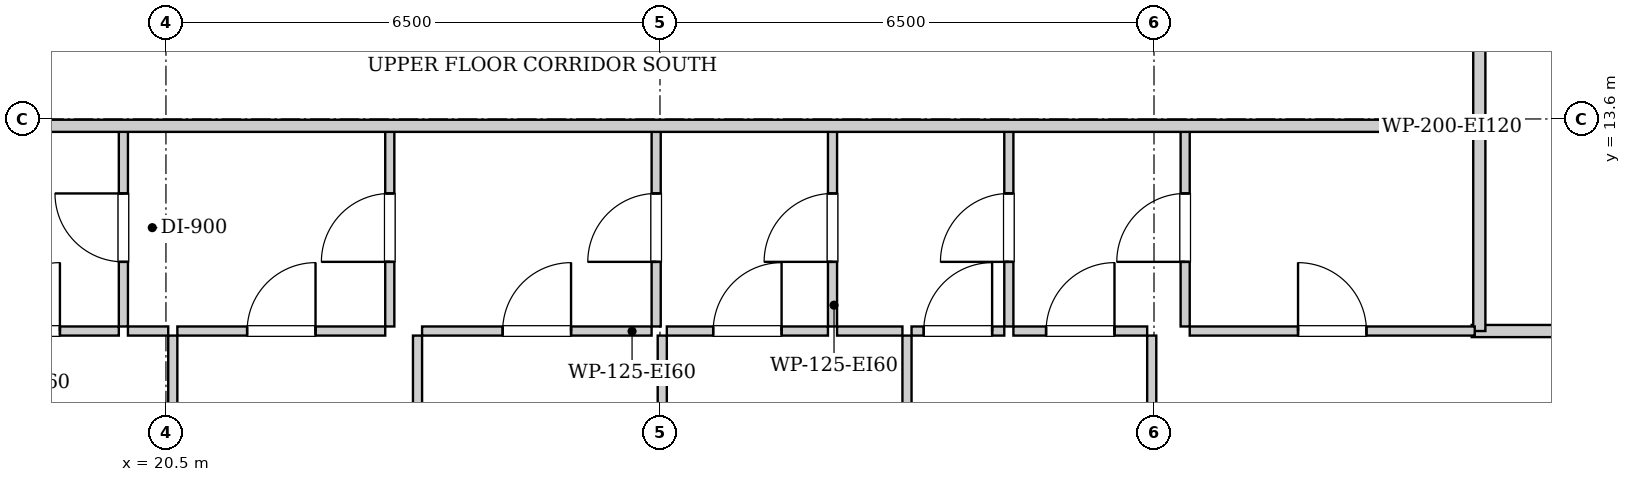
"""IFC4 building model, lengths in metres.
Left out: names, types, materials, properties, quantities, classifications, styles, units other than length and angle.
Written with IfcOpenShell. Run it as: python <this file> out.ifc"""

import sys

from ifc_helpers import new_model, si_unit, direction, frame, frame_2d, origin, place, context, subcontext, project, spatial, rectangle, extrude, element, fill, save


model = new_model("IFC4")
c1 = context("Model", 3, precision=1e-05, world=origin(), true_north=direction((0.0, 1.0)))
c2 = subcontext(c1, "Body", "Model", "MODEL_VIEW")
j1 = project(units=[si_unit("LENGTHUNIT", "METRE"), si_unit("PLANEANGLEUNIT", "RADIAN")], contexts=[c1])
p1 = place(None, origin())
s1 = spatial("IfcSite", under=j1, at=p1, CompositionType="ELEMENT")
p2 = place(p1, origin())
s2 = spatial("IfcBuilding", under=s1, at=p2, CompositionType="ELEMENT")
p3 = place(p2, frame((0.0, 0.0, 177.7)))
s3 = spatial("IfcBuildingStorey", under=s2, at=p3, CompositionType="ELEMENT", Elevation=177.7)
p4 = place(p3, frame((37.78, 13.51, 0.0), z_axis=(0.0, 0.0, 1.0), x_axis=(0.0, 1.0, 0.0)))
e1 = element("IfcWall", 1, at=p4, inside=s3, PredefinedType="PARTITIONING", context=c2, shape_type="SweptSolid", body=[
    extrude(rectangle(XDim=1.58, YDim=0.16, at=frame_2d((0.79, 0.0))), origin(), (0.0, 0.0, 1.0), 3.04),
])
p5 = place(p3, frame((37.68, 10.81, 0.0), z_axis=(0.0, 0.0, 1.0), x_axis=(1.0, 0.0, 0.0)))
e2 = element("IfcWall", 2, at=p5, inside=s3, PredefinedType="PARTITIONING", context=c2, shape_type="SweptSolid", body=[
    extrude(rectangle(XDim=2.34, YDim=0.16, at=frame_2d((1.17, 0.0))), origin(), (0.0, 0.0, 1.0), 3.04),
])
p6 = place(p3, frame((37.78, 10.81, 0.0), z_axis=(0.0, 0.0, 1.0), x_axis=(0.0, 1.0, 0.0)))
e3 = element("IfcWall", 3, at=p6, inside=s3, PredefinedType="PARTITIONING", context=c2, shape_type="SweptSolid", body=[
    extrude(rectangle(XDim=2.66, YDim=0.16, at=frame_2d((1.33, 0.0))), origin(), (0.0, 0.0, 1.0), 3.04),
])
p7 = place(p3, frame((19.94, 10.87, 0.0), z_axis=(0.0, 0.0, 1.0), x_axis=(0.0, 1.0, 0.0)))
e4 = element("IfcWall", 4, at=p7, inside=s3, PredefinedType="PARTITIONING", context=c2, shape_type="SweptSolid", body=[
    extrude(rectangle(XDim=2.6, YDim=0.12, at=frame_2d((1.3, 0.0))), origin(), (0.0, 0.0, 1.0), 3.04),
])
p8 = place(p7, frame((0.85, 0.0, 0.0)))
e5 = element("IfcOpeningElement", 5, at=p8, cuts=e4, PredefinedType="OPENING", context=c2, shape_type="SweptSolid", body=[
    extrude(rectangle(XDim=0.9, YDim=2.05, at=frame_2d((0.45, 1.025))), frame((0.0, 0.07, 0.0), z_axis=(0.0, -1.0, 0.0), x_axis=(1.0, 0.0, 0.0)), (0.0, 0.0, 1.0), 0.14),
])
p9 = place(p3, frame((17.43, 10.81, 0.0), z_axis=(0.0, 0.0, 1.0), x_axis=(1.0, 0.0, 0.0)))
e6 = element("IfcWall", 6, at=p9, inside=s3, PredefinedType="PARTITIONING", context=c2, shape_type="SweptSolid", body=[
    extrude(rectangle(XDim=2.45, YDim=0.12, at=frame_2d((1.225, 0.0))), origin(), (0.0, 0.0, 1.0), 3.04),
])
p10 = place(p9, frame((0.775, 0.0, 0.0)))
e7 = element("IfcOpeningElement", 7, at=p10, cuts=e6, PredefinedType="OPENING", context=c2, shape_type="SweptSolid", body=[
    extrude(rectangle(XDim=0.9, YDim=2.05, at=frame_2d((0.45, 1.025))), frame((0.0, 0.07, 0.0), z_axis=(0.0, -1.0, 0.0), x_axis=(1.0, 0.0, 0.0)), (0.0, 0.0, 1.0), 0.14),
])
p11 = place(p3, frame((23.445, 10.87, 0.0), z_axis=(0.0, 0.0, 1.0), x_axis=(0.0, 1.0, 0.0)))
e8 = element("IfcWall", 8, at=p11, inside=s3, PredefinedType="PARTITIONING", context=c2, shape_type="SweptSolid", body=[
    extrude(rectangle(XDim=2.6, YDim=0.12, at=frame_2d((1.3, 0.0))), origin(), (0.0, 0.0, 1.0), 3.04),
])
p12 = place(p11, frame((0.85, 0.0, 0.0)))
e9 = element("IfcOpeningElement", 9, at=p12, cuts=e8, PredefinedType="OPENING", context=c2, shape_type="SweptSolid", body=[
    extrude(rectangle(XDim=0.9, YDim=2.05, at=frame_2d((0.45, 1.025))), frame((0.0, 0.07, 0.0), z_axis=(0.0, -1.0, 0.0), x_axis=(1.0, 0.0, 0.0)), (0.0, 0.0, 1.0), 0.14),
])
p13 = place(p3, frame((20.0, 10.81, 0.0), z_axis=(0.0, 0.0, 1.0), x_axis=(1.0, 0.0, 0.0)))
e10 = element("IfcWall", 10, at=p13, inside=s3, PredefinedType="PARTITIONING", context=c2, shape_type="SweptSolid", body=[
    extrude(rectangle(XDim=0.53, YDim=0.12, at=frame_2d((0.265, 0.0))), origin(), (0.0, 0.0, 1.0), 3.04),
])
p14 = place(p3, frame((20.65, 10.81, 0.0), z_axis=(0.0, 0.0, 1.0), x_axis=(1.0, 0.0, 0.0)))
e11 = element("IfcWall", 11, at=p14, inside=s3, PredefinedType="PARTITIONING", context=c2, shape_type="SweptSolid", body=[
    extrude(rectangle(XDim=2.735, YDim=0.12, at=frame_2d((1.368, 0.0))), origin(), (0.0, 0.0, 1.0), 3.04),
])
p15 = place(p14, frame((0.918, 0.0, 0.0)))
e12 = element("IfcOpeningElement", 12, at=p15, cuts=e11, PredefinedType="OPENING", context=c2, shape_type="SweptSolid", body=[
    extrude(rectangle(XDim=0.9, YDim=2.05, at=frame_2d((0.45, 1.025))), frame((0.0, 0.07, 0.0), z_axis=(0.0, -1.0, 0.0), x_axis=(1.0, 0.0, 0.0)), (0.0, 0.0, 1.0), 0.14),
])
p16 = place(p3, frame((26.95, 10.87, 0.0), z_axis=(0.0, 0.0, 1.0), x_axis=(0.0, 1.0, 0.0)))
e13 = element("IfcWall", 13, at=p16, inside=s3, PredefinedType="PARTITIONING", context=c2, shape_type="SweptSolid", body=[
    extrude(rectangle(XDim=2.6, YDim=0.12, at=frame_2d((1.3, 0.0))), origin(), (0.0, 0.0, 1.0), 3.04),
])
p17 = place(p16, frame((0.85, 0.0, 0.0)))
e14 = element("IfcOpeningElement", 14, at=p17, cuts=e13, PredefinedType="OPENING", context=c2, shape_type="SweptSolid", body=[
    extrude(rectangle(XDim=0.9, YDim=2.05, at=frame_2d((0.45, 1.025))), frame((0.0, 0.07, 0.0), z_axis=(0.0, -1.0, 0.0), x_axis=(1.0, 0.0, 0.0)), (0.0, 0.0, 1.0), 0.14),
])
p18 = place(p3, frame((23.87, 10.81, 0.0), z_axis=(0.0, 0.0, 1.0), x_axis=(1.0, 0.0, 0.0)))
e15 = element("IfcWall", 15, at=p18, inside=s3, PredefinedType="PARTITIONING", context=c2, shape_type="SweptSolid", body=[
    extrude(rectangle(XDim=3.02, YDim=0.12, at=frame_2d((1.51, 0.0))), origin(), (0.0, 0.0, 1.0), 3.04),
])
p19 = place(p18, frame((1.06, 0.0, 0.0)))
e16 = element("IfcOpeningElement", 16, at=p19, cuts=e15, PredefinedType="OPENING", context=c2, shape_type="SweptSolid", body=[
    extrude(rectangle(XDim=0.9, YDim=2.05, at=frame_2d((0.45, 1.025))), frame((0.0, 0.07, 0.0), z_axis=(0.0, -1.0, 0.0), x_axis=(1.0, 0.0, 0.0)), (0.0, 0.0, 1.0), 0.14),
])
p20 = place(p3, frame((29.27, 10.87, 0.0), z_axis=(0.0, 0.0, 1.0), x_axis=(0.0, 1.0, 0.0)))
e17 = element("IfcWall", 17, at=p20, inside=s3, PredefinedType="PARTITIONING", context=c2, shape_type="SweptSolid", body=[
    extrude(rectangle(XDim=2.6, YDim=0.12, at=frame_2d((1.3, 0.0))), origin(), (0.0, 0.0, 1.0), 3.04),
])
p21 = place(p20, frame((0.85, 0.0, 0.0)))
e18 = element("IfcOpeningElement", 18, at=p21, cuts=e17, PredefinedType="OPENING", context=c2, shape_type="SweptSolid", body=[
    extrude(rectangle(XDim=0.9, YDim=2.05, at=frame_2d((0.45, 1.025))), frame((0.0, 0.07, 0.0), z_axis=(0.0, -1.0, 0.0), x_axis=(1.0, 0.0, 0.0)), (0.0, 0.0, 1.0), 0.14),
])
p22 = place(p3, frame((27.09, 10.81, 0.0), z_axis=(0.0, 0.0, 1.0), x_axis=(1.0, 0.0, 0.0)))
e19 = element("IfcWall", 19, at=p22, inside=s3, PredefinedType="PARTITIONING", context=c2, shape_type="SweptSolid", body=[
    extrude(rectangle(XDim=2.12, YDim=0.12, at=frame_2d((1.06, 0.0))), origin(), (0.0, 0.0, 1.0), 3.04),
])
p23 = place(p22, frame((0.61, 0.0, 0.0)))
e20 = element("IfcOpeningElement", 20, at=p23, cuts=e19, PredefinedType="OPENING", context=c2, shape_type="SweptSolid", body=[
    extrude(rectangle(XDim=0.9, YDim=2.05, at=frame_2d((0.45, 1.025))), frame((0.0, 0.07, 0.0), z_axis=(0.0, -1.0, 0.0), x_axis=(1.0, 0.0, 0.0)), (0.0, 0.0, 1.0), 0.14),
])
p24 = place(p3, frame((31.59, 10.87, 0.0), z_axis=(0.0, 0.0, 1.0), x_axis=(0.0, 1.0, 0.0)))
e21 = element("IfcWall", 21, at=p24, inside=s3, PredefinedType="PARTITIONING", context=c2, shape_type="SweptSolid", body=[
    extrude(rectangle(XDim=2.6, YDim=0.12, at=frame_2d((1.3, 0.0))), origin(), (0.0, 0.0, 1.0), 3.04),
])
p25 = place(p24, frame((0.85, 0.0, 0.0)))
e22 = element("IfcOpeningElement", 22, at=p25, cuts=e21, PredefinedType="OPENING", context=c2, shape_type="SweptSolid", body=[
    extrude(rectangle(XDim=0.9, YDim=2.05, at=frame_2d((0.45, 1.025))), frame((0.0, 0.07, 0.0), z_axis=(0.0, -1.0, 0.0), x_axis=(1.0, 0.0, 0.0)), (0.0, 0.0, 1.0), 0.14),
])
p26 = place(p3, frame((29.33, 10.81, 0.0), z_axis=(0.0, 0.0, 1.0), x_axis=(1.0, 0.0, 0.0)))
e23 = element("IfcWall", 23, at=p26, inside=s3, PredefinedType="PARTITIONING", context=c2, shape_type="SweptSolid", body=[
    extrude(rectangle(XDim=0.86, YDim=0.12, at=frame_2d((0.43, 0.0))), origin(), (0.0, 0.0, 1.0), 3.04),
])
p27 = place(p3, frame((30.31, 10.81, 0.0), z_axis=(0.0, 0.0, 1.0), x_axis=(1.0, 0.0, 0.0)))
e24 = element("IfcWall", 24, at=p27, inside=s3, PredefinedType="PARTITIONING", context=c2, shape_type="SweptSolid", body=[
    extrude(rectangle(XDim=1.22, YDim=0.12, at=frame_2d((0.61, 0.0))), origin(), (0.0, 0.0, 1.0), 3.04),
])
p28 = place(p27, frame((0.16, 0.0, 0.0)))
e25 = element("IfcOpeningElement", 25, at=p28, cuts=e24, PredefinedType="OPENING", context=c2, shape_type="SweptSolid", body=[
    extrude(rectangle(XDim=0.9, YDim=2.05, at=frame_2d((0.45, 1.025))), frame((0.0, 0.07, 0.0), z_axis=(0.0, -1.0, 0.0), x_axis=(1.0, 0.0, 0.0)), (0.0, 0.0, 1.0), 0.14),
])
p29 = place(p3, frame((33.91, 10.87, 0.0), z_axis=(0.0, 0.0, 1.0), x_axis=(0.0, 1.0, 0.0)))
e26 = element("IfcWall", 26, at=p29, inside=s3, PredefinedType="PARTITIONING", context=c2, shape_type="SweptSolid", body=[
    extrude(rectangle(XDim=2.6, YDim=0.12, at=frame_2d((1.3, 0.0))), origin(), (0.0, 0.0, 1.0), 3.04),
])
p30 = place(p29, frame((0.85, 0.0, 0.0)))
e27 = element("IfcOpeningElement", 27, at=p30, cuts=e26, PredefinedType="OPENING", context=c2, shape_type="SweptSolid", body=[
    extrude(rectangle(XDim=0.9, YDim=2.05, at=frame_2d((0.45, 1.025))), frame((0.0, 0.07, 0.0), z_axis=(0.0, -1.0, 0.0), x_axis=(1.0, 0.0, 0.0)), (0.0, 0.0, 1.0), 0.14),
])
p31 = place(p3, frame((31.65, 10.81, 0.0), z_axis=(0.0, 0.0, 1.0), x_axis=(1.0, 0.0, 0.0)))
e28 = element("IfcWall", 28, at=p31, inside=s3, PredefinedType="PARTITIONING", context=c2, shape_type="SweptSolid", body=[
    extrude(rectangle(XDim=1.76, YDim=0.12, at=frame_2d((0.88, 0.0))), origin(), (0.0, 0.0, 1.0), 3.04),
])
p32 = place(p31, frame((0.43, 0.0, 0.0)))
e29 = element("IfcOpeningElement", 29, at=p32, cuts=e28, PredefinedType="OPENING", context=c2, shape_type="SweptSolid", body=[
    extrude(rectangle(XDim=0.9, YDim=2.05, at=frame_2d((0.45, 1.025))), frame((0.0, 0.07, 0.0), z_axis=(0.0, -1.0, 0.0), x_axis=(1.0, 0.0, 0.0)), (0.0, 0.0, 1.0), 0.14),
])
p33 = place(p3, frame((33.97, 10.81, 0.0), z_axis=(0.0, 0.0, 1.0), x_axis=(1.0, 0.0, 0.0)))
e30 = element("IfcWall", 30, at=p33, inside=s3, PredefinedType="PARTITIONING", context=c2, shape_type="SweptSolid", body=[
    extrude(rectangle(XDim=3.75, YDim=0.12, at=frame_2d((1.875, 0.0))), origin(), (0.0, 0.0, 1.0), 3.04),
])
p34 = place(p33, frame((1.425, 0.0, 0.0)))
e31 = element("IfcOpeningElement", 31, at=p34, cuts=e30, PredefinedType="OPENING", context=c2, shape_type="SweptSolid", body=[
    extrude(rectangle(XDim=0.9, YDim=2.05, at=frame_2d((0.45, 1.025))), frame((0.0, 0.07, 0.0), z_axis=(0.0, -1.0, 0.0), x_axis=(1.0, 0.0, 0.0)), (0.0, 0.0, 1.0), 0.14),
])
p35 = place(p3, frame((20.59, 4.08, 0.0), z_axis=(0.0, 0.0, 1.0), x_axis=(0.0, 1.0, 0.0)))
e32 = element("IfcWall", 32, at=p35, inside=s3, PredefinedType="PARTITIONING", context=c2, shape_type="SweptSolid", body=[
    extrude(rectangle(XDim=6.67, YDim=0.12, at=frame_2d((3.335, 0.0))), origin(), (0.0, 0.0, 1.0), 3.04),
])
p36 = place(p35, frame((2.87, 0.0, 0.0)))
e33 = element("IfcOpeningElement", 33, at=p36, cuts=e32, PredefinedType="OPENING", context=c2, shape_type="SweptSolid", body=[
    extrude(rectangle(XDim=0.9, YDim=2.05, at=frame_2d((0.45, 1.025))), frame((0.0, 0.07, 0.0), z_axis=(0.0, -1.0, 0.0), x_axis=(1.0, 0.0, 0.0)), (0.0, 0.0, 1.0), 0.14),
])
p37 = place(p3, frame((23.81, 4.08, 0.0), z_axis=(0.0, 0.0, 1.0), x_axis=(0.0, 1.0, 0.0)))
e34 = element("IfcWall", 34, at=p37, inside=s3, PredefinedType="PARTITIONING", context=c2, shape_type="SweptSolid", body=[
    extrude(rectangle(XDim=6.67, YDim=0.12, at=frame_2d((3.335, 0.0))), origin(), (0.0, 0.0, 1.0), 3.04),
])
p38 = place(p37, frame((2.87, 0.0, 0.0)))
e35 = element("IfcOpeningElement", 35, at=p38, cuts=e34, PredefinedType="OPENING", context=c2, shape_type="SweptSolid", body=[
    extrude(rectangle(XDim=0.9, YDim=2.05, at=frame_2d((0.45, 1.025))), frame((0.0, 0.07, 0.0), z_axis=(0.0, -1.0, 0.0), x_axis=(1.0, 0.0, 0.0)), (0.0, 0.0, 1.0), 0.14),
])
p39 = place(p3, frame((27.03, 4.08, 0.0), z_axis=(0.0, 0.0, 1.0), x_axis=(0.0, 1.0, 0.0)))
e36 = element("IfcWall", 36, at=p39, inside=s3, PredefinedType="PARTITIONING", context=c2, shape_type="SweptSolid", body=[
    extrude(rectangle(XDim=6.67, YDim=0.12, at=frame_2d((3.335, 0.0))), origin(), (0.0, 0.0, 1.0), 3.04),
])
p40 = place(p39, frame((2.87, 0.0, 0.0)))
e37 = element("IfcOpeningElement", 37, at=p40, cuts=e36, PredefinedType="OPENING", context=c2, shape_type="SweptSolid", body=[
    extrude(rectangle(XDim=0.9, YDim=2.05, at=frame_2d((0.45, 1.025))), frame((0.0, 0.07, 0.0), z_axis=(0.0, -1.0, 0.0), x_axis=(1.0, 0.0, 0.0)), (0.0, 0.0, 1.0), 0.14),
])
p41 = place(p3, frame((30.25, 4.08, 0.0), z_axis=(0.0, 0.0, 1.0), x_axis=(0.0, 1.0, 0.0)))
e38 = element("IfcWall", 38, at=p41, inside=s3, PredefinedType="PARTITIONING", context=c2, shape_type="SweptSolid", body=[
    extrude(rectangle(XDim=6.67, YDim=0.12, at=frame_2d((3.335, 0.0))), origin(), (0.0, 0.0, 1.0), 3.04),
])
p42 = place(p41, frame((2.87, 0.0, 0.0)))
e39 = element("IfcOpeningElement", 39, at=p42, cuts=e38, PredefinedType="OPENING", context=c2, shape_type="SweptSolid", body=[
    extrude(rectangle(XDim=0.9, YDim=2.05, at=frame_2d((0.45, 1.025))), frame((0.0, 0.07, 0.0), z_axis=(0.0, -1.0, 0.0), x_axis=(1.0, 0.0, 0.0)), (0.0, 0.0, 1.0), 0.14),
])
p43 = place(p3, frame((33.47, 6.23, 0.0), z_axis=(0.0, 0.0, 1.0), x_axis=(0.0, 1.0, 0.0)))
e40 = element("IfcWall", 40, at=p43, inside=s3, PredefinedType="PARTITIONING", context=c2, shape_type="SweptSolid", body=[
    extrude(rectangle(XDim=4.52, YDim=0.12, at=frame_2d((2.26, 0.0))), origin(), (0.0, 0.0, 1.0), 3.04),
])
p44 = place(p43, frame((1.81, 0.0, 0.0)))
e41 = element("IfcOpeningElement", 41, at=p44, cuts=e40, PredefinedType="OPENING", context=c2, shape_type="SweptSolid", body=[
    extrude(rectangle(XDim=0.9, YDim=2.05, at=frame_2d((0.45, 1.025))), frame((0.0, 0.07, 0.0), z_axis=(0.0, -1.0, 0.0), x_axis=(1.0, 0.0, 0.0)), (0.0, 0.0, 1.0), 0.14),
])
p45 = place(p3, frame((13.15, 13.51, 0.0), z_axis=(0.0, 0.0, 1.0), x_axis=(1.0, 0.0, 0.0)))
e42 = element("IfcWall", 42, at=p45, inside=s3, PredefinedType="PARTITIONING", context=c2, shape_type="SweptSolid", body=[
    extrude(rectangle(XDim=24.6, YDim=0.16, at=frame_2d((12.3, 0.0))), origin(), (0.0, 0.0, 1.0), 3.04),
])
p46 = place(p45, frame((3.115, 0.0, 0.0)))
e43 = element("IfcOpeningElement", 43, at=p46, cuts=e42, PredefinedType="OPENING", context=c2, shape_type="SweptSolid", body=[
    extrude(rectangle(XDim=0.95, YDim=2.1, at=frame_2d((0.475, 1.05))), frame((0.0, 0.09, 0.0), z_axis=(0.0, -1.0, 0.0), x_axis=(1.0, 0.0, 0.0)), (0.0, 0.0, 1.0), 0.18),
])
p47 = place(p8, origin())
e44 = element("IfcDoor", 44, at=p47, inside=s3, OperationType="SINGLE_SWING_RIGHT", PredefinedType="DOOR", context=c2, shape_type="SweptSolid", body=[
    extrude(rectangle(XDim=0.9, YDim=2.05, at=frame_2d((0.45, 1.025))), frame((0.0, 0.025, 0.0), z_axis=(0.0, -1.0, 0.0), x_axis=(1.0, 0.0, 0.0)), (0.0, 0.0, 1.0), 0.05),
])
fill(e5, e44)
p48 = place(p10, origin())
e45 = element("IfcDoor", 45, at=p48, inside=s3, OperationType="SINGLE_SWING_RIGHT", PredefinedType="DOOR", context=c2, shape_type="SweptSolid", body=[
    extrude(rectangle(XDim=0.9, YDim=2.05, at=frame_2d((0.45, 1.025))), frame((0.0, 0.025, 0.0), z_axis=(0.0, -1.0, 0.0), x_axis=(1.0, 0.0, 0.0)), (0.0, 0.0, 1.0), 0.05),
])
fill(e7, e45)
p49 = place(p12, origin())
e46 = element("IfcDoor", 46, at=p49, inside=s3, OperationType="SINGLE_SWING_LEFT", PredefinedType="DOOR", context=c2, shape_type="SweptSolid", body=[
    extrude(rectangle(XDim=0.9, YDim=2.05, at=frame_2d((0.45, 1.025))), frame((0.0, 0.025, 0.0), z_axis=(0.0, -1.0, 0.0), x_axis=(1.0, 0.0, 0.0)), (0.0, 0.0, 1.0), 0.05),
])
fill(e9, e46)
p50 = place(p15, origin())
e47 = element("IfcDoor", 47, at=p50, inside=s3, OperationType="SINGLE_SWING_RIGHT", PredefinedType="DOOR", context=c2, shape_type="SweptSolid", body=[
    extrude(rectangle(XDim=0.9, YDim=2.05, at=frame_2d((0.45, 1.025))), frame((0.0, 0.025, 0.0), z_axis=(0.0, -1.0, 0.0), x_axis=(1.0, 0.0, 0.0)), (0.0, 0.0, 1.0), 0.05),
])
fill(e12, e47)
p51 = place(p17, origin())
e48 = element("IfcDoor", 48, at=p51, inside=s3, OperationType="SINGLE_SWING_LEFT", PredefinedType="DOOR", context=c2, shape_type="SweptSolid", body=[
    extrude(rectangle(XDim=0.9, YDim=2.05, at=frame_2d((0.45, 1.025))), frame((0.0, 0.025, 0.0), z_axis=(0.0, -1.0, 0.0), x_axis=(1.0, 0.0, 0.0)), (0.0, 0.0, 1.0), 0.05),
])
fill(e14, e48)
p52 = place(p19, origin())
e49 = element("IfcDoor", 49, at=p52, inside=s3, OperationType="SINGLE_SWING_RIGHT", PredefinedType="DOOR", context=c2, shape_type="SweptSolid", body=[
    extrude(rectangle(XDim=0.9, YDim=2.05, at=frame_2d((0.45, 1.025))), frame((0.0, 0.025, 0.0), z_axis=(0.0, -1.0, 0.0), x_axis=(1.0, 0.0, 0.0)), (0.0, 0.0, 1.0), 0.05),
])
fill(e16, e49)
p53 = place(p21, origin())
e50 = element("IfcDoor", 50, at=p53, inside=s3, OperationType="SINGLE_SWING_LEFT", PredefinedType="DOOR", context=c2, shape_type="SweptSolid", body=[
    extrude(rectangle(XDim=0.9, YDim=2.05, at=frame_2d((0.45, 1.025))), frame((0.0, 0.025, 0.0), z_axis=(0.0, -1.0, 0.0), x_axis=(1.0, 0.0, 0.0)), (0.0, 0.0, 1.0), 0.05),
])
fill(e18, e50)
p54 = place(p23, origin())
e51 = element("IfcDoor", 51, at=p54, inside=s3, OperationType="SINGLE_SWING_RIGHT", PredefinedType="DOOR", context=c2, shape_type="SweptSolid", body=[
    extrude(rectangle(XDim=0.9, YDim=2.05, at=frame_2d((0.45, 1.025))), frame((0.0, 0.025, 0.0), z_axis=(0.0, -1.0, 0.0), x_axis=(1.0, 0.0, 0.0)), (0.0, 0.0, 1.0), 0.05),
])
fill(e20, e51)
p55 = place(p25, origin())
e52 = element("IfcDoor", 52, at=p55, inside=s3, OperationType="SINGLE_SWING_LEFT", PredefinedType="DOOR", context=c2, shape_type="SweptSolid", body=[
    extrude(rectangle(XDim=0.9, YDim=2.05, at=frame_2d((0.45, 1.025))), frame((0.0, 0.025, 0.0), z_axis=(0.0, -1.0, 0.0), x_axis=(1.0, 0.0, 0.0)), (0.0, 0.0, 1.0), 0.05),
])
fill(e22, e52)
p56 = place(p28, origin())
e53 = element("IfcDoor", 53, at=p56, inside=s3, OperationType="SINGLE_SWING_RIGHT", PredefinedType="DOOR", context=c2, shape_type="SweptSolid", body=[
    extrude(rectangle(XDim=0.9, YDim=2.05, at=frame_2d((0.45, 1.025))), frame((0.0, 0.025, 0.0), z_axis=(0.0, -1.0, 0.0), x_axis=(1.0, 0.0, 0.0)), (0.0, 0.0, 1.0), 0.05),
])
fill(e25, e53)
p57 = place(p30, origin())
e54 = element("IfcDoor", 54, at=p57, inside=s3, OperationType="SINGLE_SWING_LEFT", PredefinedType="DOOR", context=c2, shape_type="SweptSolid", body=[
    extrude(rectangle(XDim=0.9, YDim=2.05, at=frame_2d((0.45, 1.025))), frame((0.0, 0.025, 0.0), z_axis=(0.0, -1.0, 0.0), x_axis=(1.0, 0.0, 0.0)), (0.0, 0.0, 1.0), 0.05),
])
fill(e27, e54)
p58 = place(p32, origin())
e55 = element("IfcDoor", 55, at=p58, inside=s3, OperationType="SINGLE_SWING_RIGHT", PredefinedType="DOOR", context=c2, shape_type="SweptSolid", body=[
    extrude(rectangle(XDim=0.9, YDim=2.05, at=frame_2d((0.45, 1.025))), frame((0.0, 0.025, 0.0), z_axis=(0.0, -1.0, 0.0), x_axis=(1.0, 0.0, 0.0)), (0.0, 0.0, 1.0), 0.05),
])
fill(e29, e55)
p59 = place(p34, origin())
e56 = element("IfcDoor", 56, at=p59, inside=s3, OperationType="SINGLE_SWING_LEFT", PredefinedType="DOOR", context=c2, shape_type="SweptSolid", body=[
    extrude(rectangle(XDim=0.9, YDim=2.05, at=frame_2d((0.45, 1.025))), frame((0.0, 0.025, 0.0), z_axis=(0.0, -1.0, 0.0), x_axis=(1.0, 0.0, 0.0)), (0.0, 0.0, 1.0), 0.05),
])
fill(e31, e56)
save(model, sys.argv[1])
